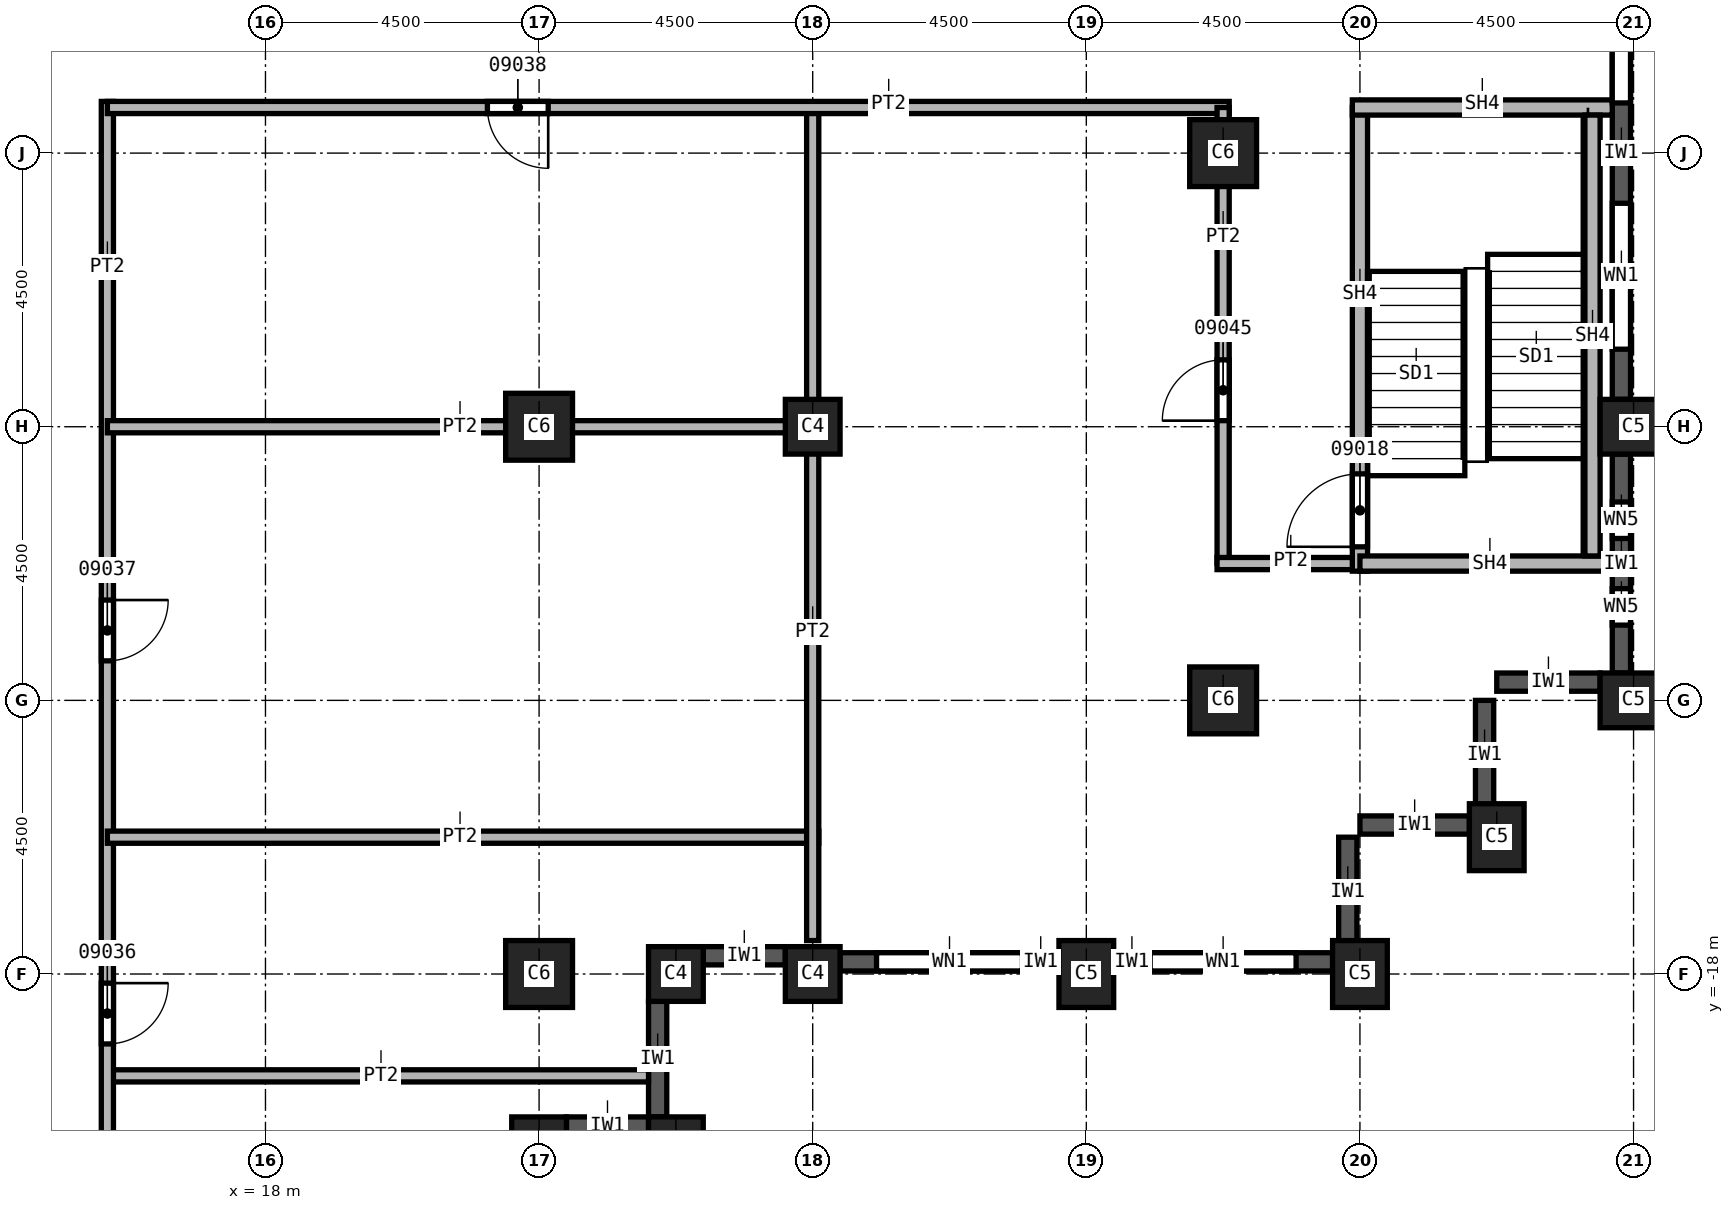
"""IFC4 building model, lengths in metres.
Left out: names, types, materials, properties, quantities, classifications, styles, units other than length and angle.
Written with IfcOpenShell. Run it as: python <this file> out.ifc"""

import sys

from ifc_helpers import new_model, si_unit, direction, frame, frame_2d, origin, origin_2d, place, context, subcontext, project, spatial, rectangle, extrude, element, fill, save


model = new_model("IFC4")
c1 = context("Model", 3, precision=1e-05, world=origin(), true_north=direction((0.0, 1.0)))
c2 = subcontext(c1, "Body", "Model", "MODEL_VIEW")
j1 = project(units=[si_unit("LENGTHUNIT", "METRE"), si_unit("PLANEANGLEUNIT", "RADIAN")], contexts=[c1])
p1 = place(None, origin())
s1 = spatial("IfcSite", under=j1, at=p1, CompositionType="ELEMENT")
p2 = place(p1, origin())
s2 = spatial("IfcBuilding", under=s1, at=p2, CompositionType="ELEMENT")
p3 = place(p2, frame((0.0, 0.0, 162.0)))
s3 = spatial("IfcBuildingStorey", under=s2, at=p3, CompositionType="ELEMENT", Elevation=162.0)
for number, where, z_axis, x_axis in (
    (1, (40.5, -9.0, 0.0), (0.0, 0.0, 1.0), (0.0, 1.0, 0.0)),
    (2, (40.5, -13.5, 0.0), (0.0, 0.0, 1.0), (0.0, 1.0, 0.0)),
    (3, (38.25, -15.75, 0.0), (0.0, 0.0, 1.0), (1.0, 0.0, 0.0)),
    (4, (31.5, -18.0, 0.0), (0.0, 0.0, 1.0), (1.0, 0.0, 0.0)),
    (5, (36.0, -18.0, 0.0), (0.0, 0.0, 1.0), (1.0, 0.0, 0.0)),
):
    element("IfcColumn", number, at=place(p3, frame(where, z_axis=z_axis, x_axis=x_axis)), inside=s3, PredefinedType="COLUMN", context=c2, shape_type="SweptSolid", body=[
        extrude(rectangle(XDim=0.9, YDim=1.1, at=origin_2d()), origin(), (0.0, 0.0, 1.0), 3.7),
    ])
for number, where, z_axis, x_axis in (
    (6, (33.75, -4.5, 0.0), (0.0, 0.0, 1.0), (1.0, 0.0, 0.0)),
    (7, (33.75, -13.5, 0.0), (0.0, 0.0, 1.0), (1.0, 0.0, 0.0)),
    (8, (22.5, -9.0, 0.0), (0.0, 0.0, 1.0), (1.0, 0.0, 0.0)),
    (9, (22.5, -18.0, 0.0), (0.0, 0.0, 1.0), (1.0, 0.0, 0.0)),
):
    element("IfcColumn", number, at=place(p3, frame(where, z_axis=z_axis, x_axis=x_axis)), inside=s3, PredefinedType="COLUMN", context=c2, shape_type="SweptSolid", body=[
        extrude(rectangle(XDim=1.1, YDim=1.1, at=origin_2d()), origin(), (0.0, 0.0, 1.0), 3.7),
    ])
for number, where, z_axis, x_axis in (
    (10, (27.0, -9.0, 0.0), (0.0, 0.0, 1.0), (1.0, 0.0, 0.0)),
    (11, (27.0, -18.0, 0.0), (0.0, 0.0, 1.0), (1.0, 0.0, 0.0)),
    (12, (22.5, -20.8, 0.0), (0.0, 0.0, 1.0), (1.0, 0.0, 0.0)),
    (13, (24.75, -20.8, 0.0), (0.0, 0.0, 1.0), (1.0, 0.0, 0.0)),
    (14, (24.75, -18.0, 0.0), (0.0, 0.0, 1.0), (1.0, 0.0, 0.0)),
):
    element("IfcColumn", number, at=place(p3, frame(where, z_axis=z_axis, x_axis=x_axis)), inside=s3, PredefinedType="COLUMN", context=c2, shape_type="SweptSolid", body=[
        extrude(rectangle(XDim=0.9, YDim=0.9, at=origin_2d()), origin(), (0.0, 0.0, 1.0), 3.7),
    ])
for number, where, z_axis, x_axis in (
    (15, (35.8, -17.55, 0.0), (0.0, 0.0, 1.0), (0.0, 1.0, 0.0)),
    (16, (37.8, -15.55, 0.0), (0.0, 0.0, 1.0), (-1.0, 0.0, 0.0)),
    (17, (38.05, -15.3, 0.0), (0.0, 0.0, 1.0), (0.0, 1.0, 0.0)),
):
    element("IfcWall", number, at=place(p3, frame(where, z_axis=z_axis, x_axis=x_axis)), inside=s3, PredefinedType="SOLIDWALL", context=c2, shape_type="SweptSolid", body=[
        extrude(rectangle(XDim=1.8, YDim=0.3, at=frame_2d((0.9, 0.0))), origin(), (0.0, 0.0, 1.0), 3.1),
    ])
p4 = place(p3, frame((39.95, -13.2, 0.0), z_axis=(0.0, 0.0, 1.0), x_axis=(-1.0, 0.0, 0.0)))
e18 = element("IfcWall", 18, at=p4, inside=s3, PredefinedType="SOLIDWALL", context=c2, shape_type="SweptSolid", body=[
    extrude(rectangle(XDim=1.7, YDim=0.3, at=frame_2d((0.85, 0.0))), origin(), (0.0, 0.0, 1.0), 3.1),
])
p5 = place(p3, frame((22.95, -20.5, 0.0), z_axis=(0.0, 0.0, 1.0), x_axis=(1.0, 0.0, 0.0)))
e19 = element("IfcWall", 19, at=p5, inside=s3, PredefinedType="SOLIDWALL", context=c2, shape_type="SweptSolid", body=[
    extrude(rectangle(XDim=1.35, YDim=0.3, at=frame_2d((0.675, 0.0))), origin(), (0.0, 0.0, 1.0), 3.1),
])
p6 = place(p3, frame((24.45, -20.35, 0.0), z_axis=(0.0, 0.0, 1.0), x_axis=(0.0, 1.0, 0.0)))
e20 = element("IfcWall", 20, at=p6, inside=s3, PredefinedType="SOLIDWALL", context=c2, shape_type="SweptSolid", body=[
    extrude(rectangle(XDim=1.9, YDim=0.3, at=frame_2d((0.95, 0.0))), origin(), (0.0, 0.0, 1.0), 3.1),
])
p7 = place(p3, frame((25.2, -17.7, 0.0), z_axis=(0.0, 0.0, 1.0), x_axis=(1.0, 0.0, 0.0)))
e21 = element("IfcWall", 21, at=p7, inside=s3, PredefinedType="SOLIDWALL", context=c2, shape_type="SweptSolid", body=[
    extrude(rectangle(XDim=1.35, YDim=0.3, at=frame_2d((0.675, 0.0))), origin(), (0.0, 0.0, 1.0), 3.1),
])
p8 = place(p3, frame((27.45, -17.8, 0.0), z_axis=(0.0, 0.0, 1.0), x_axis=(1.0, 0.0, 0.0)))
e22 = element("IfcWall", 22, at=p8, inside=s3, PredefinedType="SOLIDWALL", context=c2, shape_type="SweptSolid", body=[
    extrude(rectangle(XDim=3.6, YDim=0.3, at=frame_2d((1.8, 0.0))), origin(), (0.0, 0.0, 1.0), 3.1),
])
p9 = place(p8, frame((0.6, 0.0, 0.8)))
e23 = element("IfcOpeningElement", 23, at=p9, cuts=e22, PredefinedType="OPENING", context=c2, shape_type="SweptSolid", body=[
    extrude(rectangle(XDim=2.4, YDim=1.95, at=frame_2d((1.2, 0.975))), frame((0.0, 0.15, 0.0), z_axis=(0.0, -1.0, 0.0), x_axis=(1.0, 0.0, 0.0)), (0.0, 0.0, 1.0), 0.3),
])
p10 = place(p3, frame((31.95, -17.8, 0.0), z_axis=(0.0, 0.0, 1.0), x_axis=(1.0, 0.0, 0.0)))
e24 = element("IfcWall", 24, at=p10, inside=s3, PredefinedType="SOLIDWALL", context=c2, shape_type="SweptSolid", body=[
    extrude(rectangle(XDim=3.6, YDim=0.3, at=frame_2d((1.8, 0.0))), origin(), (0.0, 0.0, 1.0), 3.1),
])
p11 = place(p10, frame((0.6, 0.0, 0.8)))
e25 = element("IfcOpeningElement", 25, at=p11, cuts=e24, PredefinedType="OPENING", context=c2, shape_type="SweptSolid", body=[
    extrude(rectangle(XDim=2.4, YDim=1.95, at=frame_2d((1.2, 0.975))), frame((0.0, 0.15, 0.0), z_axis=(0.0, -1.0, 0.0), x_axis=(1.0, 0.0, 0.0)), (0.0, 0.0, 1.0), 0.3),
])
p12 = place(p3, frame((40.3, -13.05, 0.0), z_axis=(0.0, 0.0, 1.0), x_axis=(0.0, 1.0, 0.0)))
e26 = element("IfcWall", 26, at=p12, inside=s3, PredefinedType="SOLIDWALL", context=c2, shape_type="SweptSolid", body=[
    extrude(rectangle(XDim=3.6, YDim=0.3, at=frame_2d((1.8, 0.0))), origin(), (0.0, 0.0, 1.0), 3.1),
])
p13 = place(p12, frame((0.788, 0.0, 0.8)))
e27 = element("IfcOpeningElement", 27, at=p13, cuts=e26, PredefinedType="OPENING", context=c2, shape_type="SweptSolid", body=[
    extrude(rectangle(XDim=0.6, YDim=1.95, at=frame_2d((0.3, 0.975))), frame((0.0, 0.15, 0.0), z_axis=(0.0, -1.0, 0.0), x_axis=(1.0, 0.0, 0.0)), (0.0, 0.0, 1.0), 0.3),
])
p14 = place(p12, frame((2.212, 0.0, 0.8)))
e28 = element("IfcOpeningElement", 28, at=p14, cuts=e26, PredefinedType="OPENING", context=c2, shape_type="SweptSolid", body=[
    extrude(rectangle(XDim=0.6, YDim=1.95, at=frame_2d((0.3, 0.975))), frame((0.0, 0.15, 0.0), z_axis=(0.0, -1.0, 0.0), x_axis=(1.0, 0.0, 0.0)), (0.0, 0.0, 1.0), 0.3),
])
p15 = place(p3, frame((40.3, -8.55, 0.0), z_axis=(0.0, 0.0, 1.0), x_axis=(0.0, 1.0, 0.0)))
e29 = element("IfcWall", 29, at=p15, inside=s3, PredefinedType="SOLIDWALL", context=c2, shape_type="SweptSolid", body=[
    extrude(rectangle(XDim=8.1, YDim=0.3, at=frame_2d((4.05, 0.0))), origin(), (0.0, 0.0, 1.0), 3.1),
])
p16 = place(p15, frame((0.825, 0.0, 0.8)))
e30 = element("IfcOpeningElement", 30, at=p16, cuts=e29, PredefinedType="OPENING", context=c2, shape_type="SweptSolid", body=[
    extrude(rectangle(XDim=2.4, YDim=1.95, at=frame_2d((1.2, 0.975))), frame((0.0, 0.15, 0.0), z_axis=(0.0, -1.0, 0.0), x_axis=(1.0, 0.0, 0.0)), (0.0, 0.0, 1.0), 0.3),
])
p17 = place(p15, frame((4.875, 0.0, 0.8)))
e31 = element("IfcOpeningElement", 31, at=p17, cuts=e29, PredefinedType="OPENING", context=c2, shape_type="SweptSolid", body=[
    extrude(rectangle(XDim=2.4, YDim=1.95, at=frame_2d((1.2, 0.975))), frame((0.0, 0.15, 0.0), z_axis=(0.0, -1.0, 0.0), x_axis=(1.0, 0.0, 0.0)), (0.0, 0.0, 1.0), 0.3),
])
p18 = place(p3, frame((15.4, -19.675, 0.0), z_axis=(0.0, 0.0, 1.0), x_axis=(1.0, 0.0, 0.0)))
e32 = element("IfcWall", 32, at=p18, inside=s3, PredefinedType="PARTITIONING", context=c2, shape_type="SweptSolid", body=[
    extrude(rectangle(XDim=8.9, YDim=0.2, at=frame_2d((4.45, 0.0))), origin(), (0.0, 0.0, 1.0), 3.7),
])
p19 = place(p3, frame((15.4, -3.65, 0.0), z_axis=(0.0, 0.0, 1.0), x_axis=(0.0, -1.0, 0.0)))
e33 = element("IfcWall", 33, at=p19, inside=s3, PredefinedType="PARTITIONING", context=c2, shape_type="SweptSolid", body=[
    extrude(rectangle(XDim=19.6, YDim=0.2, at=frame_2d((9.8, 0.0))), origin(), (0.0, 0.0, 1.0), 3.7),
])
p20 = place(p19, frame((18.275, 0.0, 0.0)))
e34 = element("IfcOpeningElement", 34, at=p20, cuts=e33, PredefinedType="OPENING", context=c2, shape_type="SweptSolid", body=[
    extrude(rectangle(XDim=1.0, YDim=2.1, at=frame_2d((0.5, 1.05))), frame((0.0, 0.1, 0.0), z_axis=(0.0, -1.0, 0.0), x_axis=(1.0, 0.0, 0.0)), (0.0, 0.0, 1.0), 0.2),
])
p21 = place(p19, frame((14.5, 0.0, 0.0)))
e35 = element("IfcOpeningElement", 35, at=p21, cuts=e33, PredefinedType="OPENING", context=c2, shape_type="SweptSolid", body=[
    extrude(rectangle(XDim=1.0, YDim=2.1, at=frame_2d((0.5, 1.05))), frame((0.0, 0.1, 0.0), z_axis=(0.0, -1.0, 0.0), x_axis=(1.0, 0.0, 0.0)), (0.0, 0.0, 1.0), 0.2),
])
p22 = place(p19, frame((8.2, 0.0, 0.0)))
e36 = element("IfcOpeningElement", 36, at=p22, cuts=e33, PredefinedType="OPENING", context=c2, shape_type="SweptSolid", body=[
    extrude(rectangle(XDim=1.0, YDim=2.1, at=frame_2d((0.5, 1.05))), frame((0.0, 0.1, 0.0), z_axis=(0.0, -1.0, 0.0), x_axis=(1.0, 0.0, 0.0)), (0.0, 0.0, 1.0), 0.2),
])
for number, where, z_axis, x_axis in (
    (37, (15.4, -15.75, 0.0), (0.0, 0.0, 1.0), (1.0, 0.0, 0.0)),
    (38, (15.4, -9.0, 0.0), (0.0, 0.0, 1.0), (1.0, 0.0, 0.0)),
):
    element("IfcWall", number, at=place(p3, frame(where, z_axis=z_axis, x_axis=x_axis)), inside=s3, PredefinedType="PARTITIONING", context=c2, shape_type="SweptSolid", body=[
        extrude(rectangle(XDim=11.7, YDim=0.2, at=frame_2d((5.85, 0.0))), origin(), (0.0, 0.0, 1.0), 3.7),
    ])
p23 = place(p3, frame((27.0, -3.75, 0.0), z_axis=(0.0, 0.0, 1.0), x_axis=(0.0, -1.0, 0.0)))
e39 = element("IfcWall", 39, at=p23, inside=s3, PredefinedType="PARTITIONING", context=c2, shape_type="SweptSolid", body=[
    extrude(rectangle(XDim=13.7, YDim=0.2, at=frame_2d((6.85, 0.0))), origin(), (0.0, 0.0, 1.0), 3.7),
])
p24 = place(p3, frame((33.85, -3.75, 0.0), z_axis=(0.0, 0.0, 1.0), x_axis=(-1.0, 0.0, 0.0)))
e40 = element("IfcWall", 40, at=p24, inside=s3, PredefinedType="PARTITIONING", context=c2, shape_type="SweptSolid", body=[
    extrude(rectangle(XDim=18.45, YDim=0.2, at=frame_2d((9.225, 0.0))), origin(), (0.0, 0.0, 1.0), 3.7),
])
p25 = place(p24, frame((11.2, 0.0, 0.0)))
e41 = element("IfcOpeningElement", 41, at=p25, cuts=e40, PredefinedType="OPENING", context=c2, shape_type="SweptSolid", body=[
    extrude(rectangle(XDim=1.0, YDim=2.1, at=frame_2d((0.5, 1.05))), frame((0.0, 0.1, 0.0), z_axis=(0.0, -1.0, 0.0), x_axis=(1.0, 0.0, 0.0)), (0.0, 0.0, 1.0), 0.2),
])
p26 = place(p3, frame((33.75, -11.25, 0.0), z_axis=(0.0, 0.0, 1.0), x_axis=(0.0, 1.0, 0.0)))
e42 = element("IfcWall", 42, at=p26, inside=s3, PredefinedType="PARTITIONING", context=c2, shape_type="SweptSolid", body=[
    extrude(rectangle(XDim=7.5, YDim=0.2, at=frame_2d((3.75, 0.0))), origin(), (0.0, 0.0, 1.0), 3.7),
])
p27 = place(p26, frame((2.35, 0.0, 0.0)))
e43 = element("IfcOpeningElement", 43, at=p27, cuts=e42, PredefinedType="OPENING", context=c2, shape_type="SweptSolid", body=[
    extrude(rectangle(XDim=1.0, YDim=2.1, at=frame_2d((0.5, 1.05))), frame((0.0, 0.1, 0.0), z_axis=(0.0, -1.0, 0.0), x_axis=(1.0, 0.0, 0.0)), (0.0, 0.0, 1.0), 0.2),
])
p28 = place(p3, frame((36.0, -11.25, 0.0), z_axis=(0.0, 0.0, 1.0), x_axis=(-1.0, 0.0, 0.0)))
e44 = element("IfcWall", 44, at=p28, inside=s3, PredefinedType="PARTITIONING", context=c2, shape_type="SweptSolid", body=[
    extrude(rectangle(XDim=2.35, YDim=0.2, at=frame_2d((1.175, 0.0))), origin(), (0.0, 0.0, 1.0), 3.7),
])
p29 = place(p3, frame((36.0, -11.375, 0.0), z_axis=(0.0, 0.0, 1.0), x_axis=(0.0, 1.0, 0.0)))
e45 = element("IfcWall", 45, at=p29, inside=s3, PredefinedType="SOLIDWALL", context=c2, shape_type="SweptSolid", body=[
    extrude(rectangle(XDim=7.625, YDim=0.25, at=frame_2d((3.812, 0.0))), origin(), (0.0, 0.0, 1.0), 3.7),
])
p30 = place(p29, frame((0.4, 0.0, 0.0)))
e46 = element("IfcOpeningElement", 46, at=p30, cuts=e45, PredefinedType="OPENING", context=c2, shape_type="SweptSolid", body=[
    extrude(rectangle(XDim=1.2, YDim=2.1, at=frame_2d((0.6, 1.05))), frame((0.0, 0.125, 0.0), z_axis=(0.0, -1.0, 0.0), x_axis=(1.0, 0.0, 0.0)), (0.0, 0.0, 1.0), 0.25),
])
p31 = place(p3, frame((40.15, -11.25, 0.0), z_axis=(0.0, 0.0, 1.0), x_axis=(-1.0, 0.0, 0.0)))
e47 = element("IfcWall", 47, at=p31, inside=s3, PredefinedType="SOLIDWALL", context=c2, shape_type="SweptSolid", body=[
    extrude(rectangle(XDim=4.15, YDim=0.25, at=frame_2d((2.075, 0.0))), origin(), (0.0, 0.0, 1.0), 3.7),
])
p32 = place(p3, frame((40.15, -3.75, 0.0), z_axis=(0.0, 0.0, 1.0), x_axis=(-1.0, 0.0, 0.0)))
e48 = element("IfcWall", 48, at=p32, inside=s3, PredefinedType="SOLIDWALL", context=c2, shape_type="SweptSolid", body=[
    extrude(rectangle(XDim=4.275, YDim=0.25, at=frame_2d((2.137, 0.0))), origin(), (0.0, 0.0, 1.0), 3.7),
])
p33 = place(p3, frame((39.825, -11.125, 0.0), z_axis=(0.0, 0.0, 1.0), x_axis=(0.0, 1.0, 0.0)))
e49 = element("IfcWall", 49, at=p33, inside=s3, PredefinedType="SOLIDWALL", context=c2, shape_type="SweptSolid", body=[
    extrude(rectangle(XDim=7.25, YDim=0.25, at=frame_2d((3.625, 0.0))), origin(), (0.0, 0.0, 1.0), 3.7),
])
p34 = place(p9, origin())
e50 = element("IfcWindow", 50, at=p34, inside=s3, PartitioningType="SINGLE_PANEL", PredefinedType="WINDOW", context=c2, shape_type="SweptSolid", body=[
    extrude(rectangle(XDim=2.4, YDim=1.95, at=frame_2d((1.2, 0.975))), frame((0.0, 0.03, 0.0), z_axis=(0.0, -1.0, 0.0), x_axis=(1.0, 0.0, 0.0)), (0.0, 0.0, 1.0), 0.06),
])
fill(e23, e50)
p35 = place(p11, origin())
e51 = element("IfcWindow", 51, at=p35, inside=s3, PartitioningType="SINGLE_PANEL", PredefinedType="WINDOW", context=c2, shape_type="SweptSolid", body=[
    extrude(rectangle(XDim=2.4, YDim=1.95, at=frame_2d((1.2, 0.975))), frame((0.0, 0.03, 0.0), z_axis=(0.0, -1.0, 0.0), x_axis=(1.0, 0.0, 0.0)), (0.0, 0.0, 1.0), 0.06),
])
fill(e25, e51)
p36 = place(p16, origin())
e52 = element("IfcWindow", 52, at=p36, inside=s3, PartitioningType="SINGLE_PANEL", PredefinedType="WINDOW", context=c2, shape_type="SweptSolid", body=[
    extrude(rectangle(XDim=2.4, YDim=1.95, at=frame_2d((1.2, 0.975))), frame((0.0, 0.03, 0.0), z_axis=(0.0, -1.0, 0.0), x_axis=(1.0, 0.0, 0.0)), (0.0, 0.0, 1.0), 0.06),
])
fill(e30, e52)
p37 = place(p17, origin())
e53 = element("IfcWindow", 53, at=p37, inside=s3, PartitioningType="SINGLE_PANEL", PredefinedType="WINDOW", context=c2, shape_type="SweptSolid", body=[
    extrude(rectangle(XDim=2.4, YDim=1.95, at=frame_2d((1.2, 0.975))), frame((0.0, 0.03, 0.0), z_axis=(0.0, -1.0, 0.0), x_axis=(1.0, 0.0, 0.0)), (0.0, 0.0, 1.0), 0.06),
])
fill(e31, e53)
p38 = place(p30, origin())
e54 = element("IfcDoor", 54, at=p38, inside=s3, OperationType="SINGLE_SWING_LEFT", PredefinedType="DOOR", context=c2, shape_type="SweptSolid", body=[
    extrude(rectangle(XDim=1.2, YDim=2.1, at=frame_2d((0.6, 1.05))), frame((0.0, 0.025, 0.0), z_axis=(0.0, -1.0, 0.0), x_axis=(1.0, 0.0, 0.0)), (0.0, 0.0, 1.0), 0.05),
])
fill(e46, e54)
p39 = place(p21, origin())
e55 = element("IfcDoor", 55, at=p39, inside=s3, OperationType="SINGLE_SWING_LEFT", PredefinedType="DOOR", context=c2, shape_type="SweptSolid", body=[
    extrude(rectangle(XDim=1.0, YDim=2.1, at=frame_2d((0.5, 1.05))), frame((0.0, 0.025, 0.0), z_axis=(0.0, -1.0, 0.0), x_axis=(1.0, 0.0, 0.0)), (0.0, 0.0, 1.0), 0.05),
])
fill(e35, e55)
p40 = place(p22, origin())
e56 = element("IfcDoor", 56, at=p40, inside=s3, OperationType="SINGLE_SWING_RIGHT", PredefinedType="DOOR", context=c2, shape_type="SweptSolid", body=[
    extrude(rectangle(XDim=1.0, YDim=2.1, at=frame_2d((0.5, 1.05))), frame((0.0, 0.025, 0.0), z_axis=(0.0, -1.0, 0.0), x_axis=(1.0, 0.0, 0.0)), (0.0, 0.0, 1.0), 0.05),
])
fill(e36, e56)
p41 = place(p25, origin())
e57 = element("IfcDoor", 57, at=p41, inside=s3, OperationType="SINGLE_SWING_LEFT", PredefinedType="DOOR", context=c2, shape_type="SweptSolid", body=[
    extrude(rectangle(XDim=1.0, YDim=2.1, at=frame_2d((0.5, 1.05))), frame((0.0, 0.025, 0.0), z_axis=(0.0, -1.0, 0.0), x_axis=(1.0, 0.0, 0.0)), (0.0, 0.0, 1.0), 0.05),
])
fill(e41, e57)
p42 = place(p27, origin())
e58 = element("IfcDoor", 58, at=p42, inside=s3, OperationType="SINGLE_SWING_RIGHT", PredefinedType="DOOR", context=c2, shape_type="SweptSolid", body=[
    extrude(rectangle(XDim=1.0, YDim=2.1, at=frame_2d((0.5, 1.05))), frame((0.0, 0.025, 0.0), z_axis=(0.0, -1.0, 0.0), x_axis=(1.0, 0.0, 0.0)), (0.0, 0.0, 1.0), 0.05),
])
fill(e43, e58)
p43 = place(p13, origin())
e59 = element("IfcWindow", 59, at=p43, inside=s3, PartitioningType="SINGLE_PANEL", PredefinedType="WINDOW", context=c2, shape_type="SweptSolid", body=[
    extrude(rectangle(XDim=0.6, YDim=1.95, at=frame_2d((0.3, 0.975))), frame((0.0, 0.03, 0.0), z_axis=(0.0, -1.0, 0.0), x_axis=(1.0, 0.0, 0.0)), (0.0, 0.0, 1.0), 0.06),
])
fill(e27, e59)
p44 = place(p14, origin())
e60 = element("IfcWindow", 60, at=p44, inside=s3, PartitioningType="SINGLE_PANEL", PredefinedType="WINDOW", context=c2, shape_type="SweptSolid", body=[
    extrude(rectangle(XDim=0.6, YDim=1.95, at=frame_2d((0.3, 0.975))), frame((0.0, 0.03, 0.0), z_axis=(0.0, -1.0, 0.0), x_axis=(1.0, 0.0, 0.0)), (0.0, 0.0, 1.0), 0.06),
])
fill(e28, e60)
save(model, sys.argv[1])
